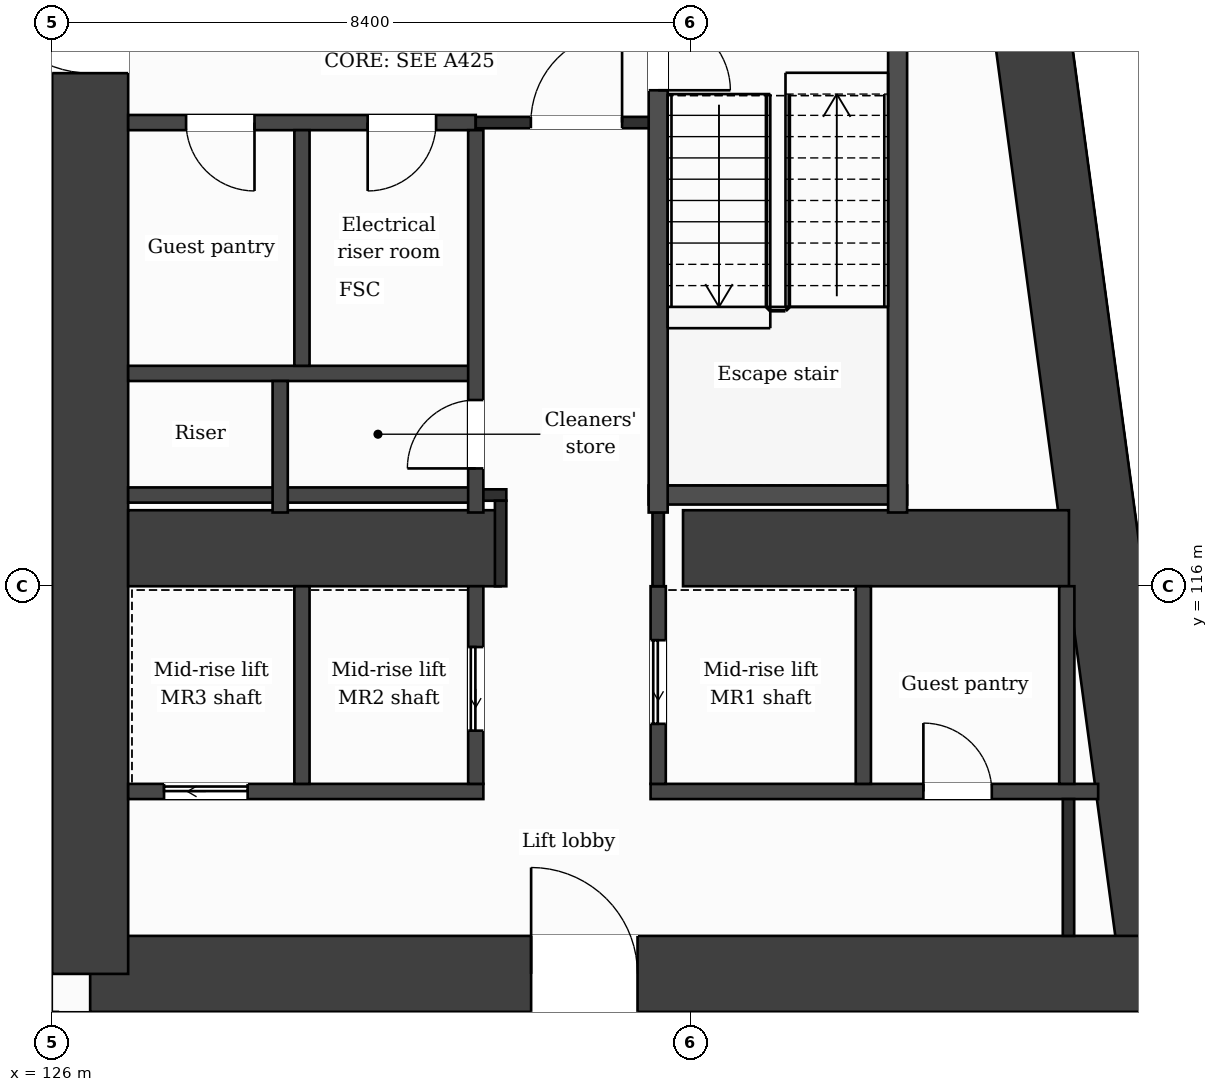
"""IFC4 building model, lengths in metres.
Left out: names, types, materials, properties, quantities, classifications, styles, units other than length and angle.
Written with IfcOpenShell. Run it as: python <this file> out.ifc"""

import sys

from ifc_helpers import new_model, si_unit, direction, frame, frame_2d, origin, place, context, subcontext, project, spatial, rectangle, extrude, element, fill, save


model = new_model("IFC4")
c1 = context("Model", 3, precision=1e-05, world=origin(), true_north=direction((0.0, 1.0)))
c2 = subcontext(c1, "Body", "Model", "MODEL_VIEW")
j1 = project(units=[si_unit("LENGTHUNIT", "METRE"), si_unit("PLANEANGLEUNIT", "RADIAN")], contexts=[c1])
p1 = place(None, origin())
s1 = spatial("IfcSite", under=j1, at=p1, CompositionType="ELEMENT")
p2 = place(p1, origin())
s2 = spatial("IfcBuilding", under=s1, at=p2, CompositionType="ELEMENT")
p3 = place(p2, frame((0.0, 0.0, 105.8)))
s3 = spatial("IfcBuildingStorey", under=s2, at=p3, CompositionType="ELEMENT", Elevation=105.8)
p4 = place(p3, frame((137.732, 131.9, 0.0), z_axis=(0.0, 0.0, 1.0), x_axis=(0.133411141623, -0.991060778808, 0.0)))
e1 = element("IfcWall", 1, at=p4, inside=s3, PredefinedType="SHEAR", context=c2, shape_type="SweptSolid", body=[
    extrude(rectangle(XDim=21.189, YDim=1.0, at=frame_2d((10.595, 0.0))), origin(), (0.0, 0.0, 1.0), 3.7),
])
p5 = place(p3, frame((140.559, 110.9, 0.0), z_axis=(0.0, 0.0, 1.0), x_axis=(-1.0, 0.0, 0.0)))
e2 = element("IfcWall", 2, at=p5, inside=s3, PredefinedType="SHEAR", context=c2, shape_type="SweptSolid", body=[
    extrude(rectangle(XDim=14.059, YDim=1.0, at=frame_2d((7.029, 0.0))), origin(), (0.0, 0.0, 1.0), 3.7),
])
p6 = place(p5, frame((6.858, 0.0, 0.0)))
e3 = element("IfcOpeningElement", 3, at=p6, cuts=e2, PredefinedType="OPENING", context=c2, shape_type="SweptSolid", body=[
    extrude(rectangle(XDim=1.4, YDim=2.1, at=frame_2d((0.7, 1.05))), frame((0.0, 0.51, 0.0), z_axis=(0.0, -1.0, 0.0), x_axis=(1.0, 0.0, 0.0)), (0.0, 0.0, 1.0), 1.02),
])
p7 = place(p3, frame((126.5, 110.9, 0.0), z_axis=(0.0, 0.0, 1.0), x_axis=(0.0, 1.0, 0.0)))
e4 = element("IfcWall", 4, at=p7, inside=s3, PredefinedType="SHEAR", context=c2, shape_type="SweptSolid", body=[
    extrude(rectangle(XDim=21.0, YDim=1.0, at=frame_2d((10.5, 0.0))), origin(), (0.0, 0.0, 1.0), 3.7),
])
p8 = place(p7, frame((11.85, 0.0, 0.0)))
e5 = element("IfcOpeningElement", 5, at=p8, cuts=e4, PredefinedType="OPENING", context=c2, shape_type="SweptSolid", body=[
    extrude(rectangle(XDim=1.4, YDim=2.1, at=frame_2d((0.7, 1.05))), frame((0.0, 0.51, 0.0), z_axis=(0.0, -1.0, 0.0), x_axis=(1.0, 0.0, 0.0)), (0.0, 0.0, 1.0), 1.02),
])
p9 = place(p3, frame((127.0, 116.5, 0.0), z_axis=(0.0, 0.0, 1.0), x_axis=(1.0, 0.0, 0.0)))
e6 = element("IfcWall", 6, at=p9, inside=s3, PredefinedType="SHEAR", context=c2, shape_type="SweptSolid", body=[
    extrude(rectangle(XDim=4.9, YDim=1.0, at=frame_2d((2.45, 0.0))), origin(), (0.0, 0.0, 1.0), 3.7),
])
p10 = place(p3, frame((134.3, 116.5, 0.0), z_axis=(0.0, 0.0, 1.0), x_axis=(1.0, 0.0, 0.0)))
e7 = element("IfcWall", 7, at=p10, inside=s3, PredefinedType="SHEAR", context=c2, shape_type="SweptSolid", body=[
    extrude(rectangle(XDim=5.077, YDim=1.0, at=frame_2d((2.539, 0.0))), origin(), (0.0, 0.0, 1.0), 3.7),
])
p11 = place(p3, frame((140.348, 103.85, 0.0), z_axis=(0.0, 0.0, 1.0), x_axis=(-0.133431549479, 0.991058031401, 0.0)))
e8 = element("IfcWall", 8, at=p11, inside=s3, PredefinedType="SOLIDWALL", context=c2, shape_type="SweptSolid", body=[
    extrude(rectangle(XDim=6.609, YDim=0.3, at=frame_2d((3.304, 0.0))), origin(), (0.0, 0.0, 1.0), 3.38),
])
p12 = place(p11, frame((0.737, 0.0, 0.9)))
e9 = element("IfcOpeningElement", 9, at=p12, cuts=e8, PredefinedType="OPENING", context=c2, shape_type="SweptSolid", body=[
    extrude(rectangle(XDim=1.2, YDim=2.1, at=frame_2d((0.6, 1.05))), frame((0.0, 0.16, 0.0), z_axis=(0.0, -1.0, 0.0), x_axis=(1.0, 0.0, 0.0)), (0.0, 0.0, 1.0), 0.32),
])
p13 = place(p11, frame((3.991, 0.0, 0.0)))
e10 = element("IfcOpeningElement", 10, at=p13, cuts=e8, PredefinedType="OPENING", context=c2, shape_type="SweptSolid", body=[
    extrude(rectangle(XDim=1.2, YDim=2.4, at=frame_2d((0.6, 1.2))), frame((0.0, 0.16, 0.0), z_axis=(0.0, -1.0, 0.0), x_axis=(1.0, 0.0, 0.0)), (0.0, 0.0, 1.0), 0.32),
])
p14 = place(p3, frame((127.0, 113.3, 0.0), z_axis=(0.0, 0.0, 1.0), x_axis=(1.0, 0.0, 0.0)))
e11 = element("IfcWall", 11, at=p14, inside=s3, PredefinedType="PARTITIONING", context=c2, shape_type="SweptSolid", body=[
    extrude(rectangle(XDim=4.673, YDim=0.2, at=frame_2d((2.336, 0.0))), origin(), (0.0, 0.0, 1.0), 3.38),
])
p15 = place(p14, frame((0.472, 0.0, 0.0)))
e12 = element("IfcOpeningElement", 12, at=p15, cuts=e11, PredefinedType="OPENING", context=c2, shape_type="SweptSolid", body=[
    extrude(rectangle(XDim=1.1, YDim=2.1, at=frame_2d((0.55, 1.05))), frame((0.0, 0.11, 0.0), z_axis=(0.0, -1.0, 0.0), x_axis=(1.0, 0.0, 0.0)), (0.0, 0.0, 1.0), 0.22),
])
p16 = place(p3, frame((133.873, 113.3, 0.0), z_axis=(0.0, 0.0, 1.0), x_axis=(1.0, 0.0, 0.0)))
e13 = element("IfcWall", 13, at=p16, inside=s3, PredefinedType="PARTITIONING", context=c2, shape_type="SweptSolid", body=[
    extrude(rectangle(XDim=5.888, YDim=0.2, at=frame_2d((2.944, 0.0))), origin(), (0.0, 0.0, 1.0), 3.38),
])
p17 = place(p16, frame((3.589, 0.0, 0.0)))
e14 = element("IfcOpeningElement", 14, at=p17, cuts=e13, PredefinedType="OPENING", context=c2, shape_type="SweptSolid", body=[
    extrude(rectangle(XDim=0.9, YDim=2.1, at=frame_2d((0.45, 1.05))), frame((0.0, 0.11, 0.0), z_axis=(0.0, -1.0, 0.0), x_axis=(1.0, 0.0, 0.0)), (0.0, 0.0, 1.0), 0.22),
])
p18 = place(p3, frame((127.0, 117.2, 0.0), z_axis=(0.0, 0.0, 1.0), x_axis=(1.0, 0.0, 0.0)))
e15 = element("IfcWall", 15, at=p18, inside=s3, PredefinedType="PARTITIONING", context=c2, shape_type="SweptSolid", body=[
    extrude(rectangle(XDim=4.573, YDim=0.2, at=frame_2d((2.287, 0.0))), origin(), (0.0, 0.0, 1.0), 3.38),
])
p19 = place(p3, frame((131.573, 117.2, 0.0), z_axis=(0.0, 0.0, 1.0), x_axis=(1.0, 0.0, 0.0)))
e16 = element("IfcWall", 16, at=p19, inside=s3, PredefinedType="PARTITIONING", context=c2, shape_type="SweptSolid", body=[
    extrude(rectangle(XDim=0.402, YDim=0.15, at=frame_2d((0.201, 0.0))), origin(), (0.0, 0.0, 1.0), 3.38),
])
p20 = place(p3, frame((133.848, 117.2, 0.0), z_axis=(0.0, 0.0, 1.0), x_axis=(1.0, 0.0, 0.0)))
e17 = element("IfcWall", 17, at=p20, inside=s3, PredefinedType="PARTITIONING", context=c2, shape_type="SweptSolid", body=[
    extrude(rectangle(XDim=3.4, YDim=0.25, at=frame_2d((1.7, 0.0))), origin(), (0.0, 0.0, 1.0), 3.38),
])
p21 = place(p3, frame((127.0, 118.8, 0.0), z_axis=(0.0, 0.0, 1.0), x_axis=(1.0, 0.0, 0.0)))
e18 = element("IfcWall", 18, at=p21, inside=s3, PredefinedType="PARTITIONING", context=c2, shape_type="SweptSolid", body=[
    extrude(rectangle(XDim=4.573, YDim=0.2, at=frame_2d((2.287, 0.0))), origin(), (0.0, 0.0, 1.0), 3.38),
])
p22 = place(p3, frame((127.0, 122.1, 0.0), z_axis=(0.0, 0.0, 1.0), x_axis=(1.0, 0.0, 0.0)))
e19 = element("IfcWall", 19, at=p22, inside=s3, PredefinedType="PARTITIONING", context=c2, shape_type="SweptSolid", body=[
    extrude(rectangle(XDim=4.573, YDim=0.2, at=frame_2d((2.287, 0.0))), origin(), (0.0, 0.0, 1.0), 3.38),
])
p23 = place(p22, frame((3.151, 0.0, 0.0)))
e20 = element("IfcOpeningElement", 20, at=p23, cuts=e19, PredefinedType="OPENING", context=c2, shape_type="SweptSolid", body=[
    extrude(rectangle(XDim=0.9, YDim=2.1, at=frame_2d((0.45, 1.05))), frame((0.0, 0.11, 0.0), z_axis=(0.0, -1.0, 0.0), x_axis=(1.0, 0.0, 0.0)), (0.0, 0.0, 1.0), 0.22),
])
p24 = place(p22, frame((0.762, 0.0, 0.0)))
e21 = element("IfcOpeningElement", 21, at=p24, cuts=e19, PredefinedType="OPENING", context=c2, shape_type="SweptSolid", body=[
    extrude(rectangle(XDim=0.9, YDim=2.1, at=frame_2d((0.45, 1.05))), frame((0.0, 0.11, 0.0), z_axis=(0.0, -1.0, 0.0), x_axis=(1.0, 0.0, 0.0)), (0.0, 0.0, 1.0), 0.22),
])
p25 = place(p3, frame((131.573, 122.1, 0.0), z_axis=(0.0, 0.0, 1.0), x_axis=(1.0, 0.0, 0.0)))
e22 = element("IfcWall", 22, at=p25, inside=s3, PredefinedType="PARTITIONING", context=c2, shape_type="SweptSolid", body=[
    extrude(rectangle(XDim=2.4, YDim=0.15, at=frame_2d((1.2, 0.0))), origin(), (0.0, 0.0, 1.0), 3.38),
])
p26 = place(p25, frame((0.725, 0.0, 0.0)))
e23 = element("IfcOpeningElement", 23, at=p26, cuts=e22, PredefinedType="OPENING", context=c2, shape_type="SweptSolid", body=[
    extrude(rectangle(XDim=1.2, YDim=2.1, at=frame_2d((0.6, 1.05))), frame((0.0, 0.085, 0.0), z_axis=(0.0, -1.0, 0.0), x_axis=(1.0, 0.0, 0.0)), (0.0, 0.0, 1.0), 0.17),
])
p27 = place(p3, frame((100.8, 122.45, 0.0), z_axis=(0.0, 0.0, 1.0), x_axis=(1.0, 0.0, 0.0)))
e24 = element("IfcWall", 24, at=p27, inside=s3, PredefinedType="PARTITIONING", context=c2, shape_type="SweptSolid", body=[
    extrude(rectangle(XDim=25.2, YDim=0.15, at=frame_2d((12.6, 0.0))), origin(), (0.0, 0.0, 1.0), 3.38),
])
p28 = place(p3, frame((126.0, 109.075, 0.0), z_axis=(0.0, 0.0, 1.0), x_axis=(0.0, 1.0, 0.0)))
e25 = element("IfcWall", 25, at=p28, inside=s3, PredefinedType="PARTITIONING", context=c2, shape_type="SweptSolid", body=[
    extrude(rectangle(XDim=1.325, YDim=0.15, at=frame_2d((0.663, 0.0))), origin(), (0.0, 0.0, 1.0), 3.38),
])
p29 = place(p3, frame((129.0, 116.97, 0.0), z_axis=(0.0, 0.0, 1.0), x_axis=(0.0, 1.0, 0.0)))
e26 = element("IfcWall", 26, at=p29, inside=s3, PredefinedType="PARTITIONING", context=c2, shape_type="SweptSolid", body=[
    extrude(rectangle(XDim=1.73, YDim=0.2, at=frame_2d((0.865, 0.0))), origin(), (0.0, 0.0, 1.0), 3.38),
])
p30 = place(p3, frame((129.287, 113.4, 0.0), z_axis=(0.0, 0.0, 1.0), x_axis=(0.0, 1.0, 0.0)))
e27 = element("IfcWall", 27, at=p30, inside=s3, PredefinedType="PARTITIONING", context=c2, shape_type="SweptSolid", body=[
    extrude(rectangle(XDim=2.6, YDim=0.2, at=frame_2d((1.3, 0.0))), origin(), (0.0, 0.0, 1.0), 3.38),
])
p31 = place(p3, frame((129.287, 118.9, 0.0), z_axis=(0.0, 0.0, 1.0), x_axis=(0.0, 1.0, 0.0)))
e28 = element("IfcWall", 28, at=p31, inside=s3, PredefinedType="PARTITIONING", context=c2, shape_type="SweptSolid", body=[
    extrude(rectangle(XDim=3.1, YDim=0.2, at=frame_2d((1.55, 0.0))), origin(), (0.0, 0.0, 1.0), 3.38),
])
p32 = place(p3, frame((131.573, 113.4, 0.0), z_axis=(0.0, 0.0, 1.0), x_axis=(0.0, 1.0, 0.0)))
e29 = element("IfcWall", 29, at=p32, inside=s3, PredefinedType="PARTITIONING", context=c2, shape_type="SweptSolid", body=[
    extrude(rectangle(XDim=2.6, YDim=0.2, at=frame_2d((1.3, 0.0))), origin(), (0.0, 0.0, 1.0), 3.38),
])
p33 = place(p32, frame((0.7, 0.0, 0.0)))
e30 = element("IfcOpeningElement", 30, at=p33, cuts=e29, PredefinedType="OPENING", context=c2, shape_type="SweptSolid", body=[
    extrude(rectangle(XDim=1.1, YDim=2.1, at=frame_2d((0.55, 1.05))), frame((0.0, 0.11, 0.0), z_axis=(0.0, -1.0, 0.0), x_axis=(1.0, 0.0, 0.0)), (0.0, 0.0, 1.0), 0.22),
])
p34 = place(p3, frame((131.573, 116.97, 0.0), z_axis=(0.0, 0.0, 1.0), x_axis=(0.0, 1.0, 0.0)))
e31 = element("IfcWall", 31, at=p34, inside=s3, PredefinedType="PARTITIONING", context=c2, shape_type="SweptSolid", body=[
    extrude(rectangle(XDim=5.03, YDim=0.2, at=frame_2d((2.515, 0.0))), origin(), (0.0, 0.0, 1.0), 3.38),
])
p35 = place(p34, frame((0.58, 0.0, 0.0)))
e32 = element("IfcOpeningElement", 32, at=p35, cuts=e31, PredefinedType="OPENING", context=c2, shape_type="SweptSolid", body=[
    extrude(rectangle(XDim=0.9, YDim=2.1, at=frame_2d((0.45, 1.05))), frame((0.0, 0.11, 0.0), z_axis=(0.0, -1.0, 0.0), x_axis=(1.0, 0.0, 0.0)), (0.0, 0.0, 1.0), 0.22),
])
p36 = place(p3, frame((131.9, 116.0, 0.0), z_axis=(0.0, 0.0, 1.0), x_axis=(0.0, 1.0, 0.0)))
e33 = element("IfcWall", 33, at=p36, inside=s3, PredefinedType="PARTITIONING", context=c2, shape_type="SweptSolid", body=[
    extrude(rectangle(XDim=1.125, YDim=0.15, at=frame_2d((0.562, 0.0))), origin(), (0.0, 0.0, 1.0), 3.38),
])
p37 = place(p3, frame((133.973, 113.4, 0.0), z_axis=(0.0, 0.0, 1.0), x_axis=(0.0, 1.0, 0.0)))
e34 = element("IfcWall", 34, at=p37, inside=s3, PredefinedType="PARTITIONING", context=c2, shape_type="SweptSolid", body=[
    extrude(rectangle(XDim=2.6, YDim=0.2, at=frame_2d((1.3, 0.0))), origin(), (0.0, 0.0, 1.0), 3.38),
])
p38 = place(p37, frame((0.79, 0.0, 0.0)))
e35 = element("IfcOpeningElement", 35, at=p38, cuts=e34, PredefinedType="OPENING", context=c2, shape_type="SweptSolid", body=[
    extrude(rectangle(XDim=1.1, YDim=2.1, at=frame_2d((0.55, 1.05))), frame((0.0, 0.11, 0.0), z_axis=(0.0, -1.0, 0.0), x_axis=(1.0, 0.0, 0.0)), (0.0, 0.0, 1.0), 0.22),
])
p39 = place(p3, frame((133.973, 116.0, 0.0), z_axis=(0.0, 0.0, 1.0), x_axis=(0.0, 1.0, 0.0)))
e36 = element("IfcWall", 36, at=p39, inside=s3, PredefinedType="PARTITIONING", context=c2, shape_type="SweptSolid", body=[
    extrude(rectangle(XDim=0.97, YDim=0.15, at=frame_2d((0.485, 0.0))), origin(), (0.0, 0.0, 1.0), 3.38),
])
p40 = place(p3, frame((133.973, 116.97, 0.0), z_axis=(0.0, 0.0, 1.0), x_axis=(0.0, 1.0, 0.0)))
e37 = element("IfcWall", 37, at=p40, inside=s3, PredefinedType="PARTITIONING", context=c2, shape_type="SweptSolid", body=[
    extrude(rectangle(XDim=6.855, YDim=0.25, at=frame_2d((3.427, 0.0))), origin(), (0.0, 0.0, 1.0), 3.38),
])
p41 = place(p40, frame((5.555, 0.0, 0.0)))
e38 = element("IfcOpeningElement", 38, at=p41, cuts=e37, PredefinedType="OPENING", context=c2, shape_type="SweptSolid", body=[
    extrude(rectangle(XDim=0.95, YDim=2.1, at=frame_2d((0.475, 1.05))), frame((0.0, 0.135, 0.0), z_axis=(0.0, -1.0, 0.0), x_axis=(1.0, 0.0, 0.0)), (0.0, 0.0, 1.0), 0.27),
])
p42 = place(p3, frame((136.672, 113.4, 0.0), z_axis=(0.0, 0.0, 1.0), x_axis=(0.0, 1.0, 0.0)))
e39 = element("IfcWall", 39, at=p42, inside=s3, PredefinedType="PARTITIONING", context=c2, shape_type="SweptSolid", body=[
    extrude(rectangle(XDim=2.6, YDim=0.2, at=frame_2d((1.3, 0.0))), origin(), (0.0, 0.0, 1.0), 3.38),
])
p43 = place(p3, frame((137.123, 116.97, 0.0), z_axis=(0.0, 0.0, 1.0), x_axis=(0.0, 1.0, 0.0)))
e40 = element("IfcWall", 40, at=p43, inside=s3, PredefinedType="PARTITIONING", context=c2, shape_type="SweptSolid", body=[
    extrude(rectangle(XDim=6.855, YDim=0.25, at=frame_2d((3.427, 0.0))), origin(), (0.0, 0.0, 1.0), 3.38),
])
p44 = place(p3, frame((139.349, 113.4, 0.0), z_axis=(0.0, 0.0, 1.0), x_axis=(0.0, 1.0, 0.0)))
e41 = element("IfcWall", 41, at=p44, inside=s3, PredefinedType="PARTITIONING", context=c2, shape_type="SweptSolid", body=[
    extrude(rectangle(XDim=2.6, YDim=0.2, at=frame_2d((1.3, 0.0))), origin(), (0.0, 0.0, 1.0), 3.38),
])
p45 = place(p3, frame((139.371, 111.4, 0.0), z_axis=(0.0, 0.0, 1.0), x_axis=(0.0, 1.0, 0.0)))
e42 = element("IfcWall", 42, at=p45, inside=s3, PredefinedType="PARTITIONING", context=c2, shape_type="SweptSolid", body=[
    extrude(rectangle(XDim=1.8, YDim=0.15, at=frame_2d((0.9, 0.0))), origin(), (0.0, 0.0, 1.0), 3.38),
])
p46 = place(p26, origin())
e43 = element("IfcDoor", 43, at=p46, inside=s3, OperationType="SINGLE_SWING_RIGHT", PredefinedType="DOOR", context=c2, shape_type="SweptSolid", body=[
    extrude(rectangle(XDim=1.2, YDim=2.1, at=frame_2d((0.6, 1.05))), frame((0.0, 0.025, 0.0), z_axis=(0.0, -1.0, 0.0), x_axis=(1.0, 0.0, 0.0)), (0.0, 0.0, 1.0), 0.05),
])
fill(e23, e43)
p47 = place(p23, origin())
e44 = element("IfcDoor", 44, at=p47, inside=s3, OperationType="SINGLE_SWING_LEFT", PredefinedType="DOOR", context=c2, shape_type="SweptSolid", body=[
    extrude(rectangle(XDim=0.9, YDim=2.1, at=frame_2d((0.45, 1.05))), frame((0.0, 0.025, 0.0), z_axis=(0.0, -1.0, 0.0), x_axis=(1.0, 0.0, 0.0)), (0.0, 0.0, 1.0), 0.05),
])
fill(e20, e44)
p48 = place(p24, origin())
e45 = element("IfcDoor", 45, at=p48, inside=s3, OperationType="SINGLE_SWING_RIGHT", PredefinedType="DOOR", context=c2, shape_type="SweptSolid", body=[
    extrude(rectangle(XDim=0.9, YDim=2.1, at=frame_2d((0.45, 1.05))), frame((0.0, 0.025, 0.0), z_axis=(0.0, -1.0, 0.0), x_axis=(1.0, 0.0, 0.0)), (0.0, 0.0, 1.0), 0.05),
])
fill(e21, e45)
p49 = place(p41, origin())
e46 = element("IfcDoor", 46, at=p49, inside=s3, OperationType="SINGLE_SWING_LEFT", PredefinedType="DOOR", context=c2, shape_type="SweptSolid", body=[
    extrude(rectangle(XDim=0.95, YDim=2.1, at=frame_2d((0.475, 1.05))), frame((0.0, 0.025, 0.0), z_axis=(0.0, -1.0, 0.0), x_axis=(1.0, 0.0, 0.0)), (0.0, 0.0, 1.0), 0.05),
])
fill(e38, e46)
p50 = place(p35, origin())
e47 = element("IfcDoor", 47, at=p50, inside=s3, OperationType="SINGLE_SWING_LEFT", PredefinedType="DOOR", context=c2, shape_type="SweptSolid", body=[
    extrude(rectangle(XDim=0.9, YDim=2.1, at=frame_2d((0.45, 1.05))), frame((0.0, 0.025, 0.0), z_axis=(0.0, -1.0, 0.0), x_axis=(1.0, 0.0, 0.0)), (0.0, 0.0, 1.0), 0.05),
])
fill(e32, e47)
p51 = place(p38, origin())
e48 = element("IfcDoor", 48, at=p51, inside=s3, OperationType="SLIDING_TO_LEFT", PredefinedType="DOOR", context=c2, shape_type="SweptSolid", body=[
    extrude(rectangle(XDim=1.1, YDim=2.1, at=frame_2d((0.55, 1.05))), frame((0.0, 0.025, 0.0), z_axis=(0.0, -1.0, 0.0), x_axis=(1.0, 0.0, 0.0)), (0.0, 0.0, 1.0), 0.05),
])
fill(e35, e48)
p52 = place(p33, origin())
e49 = element("IfcDoor", 49, at=p52, inside=s3, OperationType="SLIDING_TO_LEFT", PredefinedType="DOOR", context=c2, shape_type="SweptSolid", body=[
    extrude(rectangle(XDim=1.1, YDim=2.1, at=frame_2d((0.55, 1.05))), frame((0.0, 0.025, 0.0), z_axis=(0.0, -1.0, 0.0), x_axis=(1.0, 0.0, 0.0)), (0.0, 0.0, 1.0), 0.05),
])
fill(e30, e49)
p53 = place(p15, origin())
e50 = element("IfcDoor", 50, at=p53, inside=s3, OperationType="SLIDING_TO_LEFT", PredefinedType="DOOR", context=c2, shape_type="SweptSolid", body=[
    extrude(rectangle(XDim=1.1, YDim=2.1, at=frame_2d((0.55, 1.05))), frame((0.0, 0.025, 0.0), z_axis=(0.0, -1.0, 0.0), x_axis=(1.0, 0.0, 0.0)), (0.0, 0.0, 1.0), 0.05),
])
fill(e12, e50)
p54 = place(p17, origin())
e51 = element("IfcDoor", 51, at=p54, inside=s3, OperationType="SINGLE_SWING_LEFT", PredefinedType="DOOR", context=c2, shape_type="SweptSolid", body=[
    extrude(rectangle(XDim=0.9, YDim=2.1, at=frame_2d((0.45, 1.05))), frame((0.0, 0.025, 0.0), z_axis=(0.0, -1.0, 0.0), x_axis=(1.0, 0.0, 0.0)), (0.0, 0.0, 1.0), 0.05),
])
fill(e14, e51)
p55 = place(p6, origin())
e52 = element("IfcDoor", 52, at=p55, inside=s3, OperationType="SINGLE_SWING_RIGHT", PredefinedType="DOOR", context=c2, shape_type="SweptSolid", body=[
    extrude(rectangle(XDim=1.4, YDim=2.1, at=frame_2d((0.7, 1.05))), frame((0.0, 0.025, 0.0), z_axis=(0.0, -1.0, 0.0), x_axis=(1.0, 0.0, 0.0)), (0.0, 0.0, 1.0), 0.05),
])
fill(e3, e52)
p56 = place(p8, origin())
e53 = element("IfcDoor", 53, at=p56, inside=s3, OperationType="SINGLE_SWING_RIGHT", PredefinedType="DOOR", context=c2, shape_type="SweptSolid", body=[
    extrude(rectangle(XDim=1.4, YDim=2.1, at=frame_2d((0.7, 1.05))), frame((0.0, 0.025, 0.0), z_axis=(0.0, -1.0, 0.0), x_axis=(1.0, 0.0, 0.0)), (0.0, 0.0, 1.0), 0.05),
])
fill(e5, e53)
save(model, sys.argv[1])
